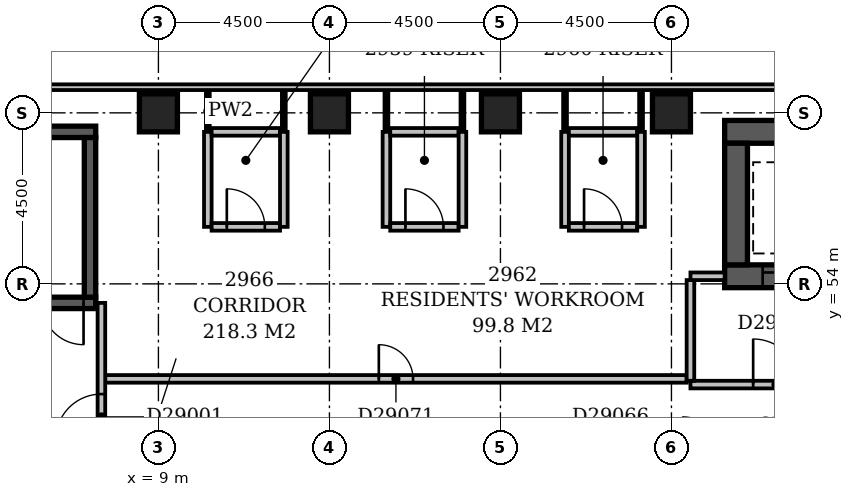
"""IFC4 building model, lengths in metres.
Left out: names, types, materials, properties, quantities, classifications, styles, units other than length and angle.
Written with IfcOpenShell. Run it as: python <this file> out.ifc"""

import sys

from ifc_helpers import new_model, si_unit, direction, frame, frame_2d, origin, origin_2d, place, context, subcontext, project, spatial, rectangle, extrude, element, fill, save


model = new_model("IFC4")
c1 = context("Model", 3, precision=1e-05, world=origin(), true_north=direction((0.0, 1.0)))
c2 = subcontext(c1, "Body", "Model", "MODEL_VIEW")
j1 = project(units=[si_unit("LENGTHUNIT", "METRE"), si_unit("PLANEANGLEUNIT", "RADIAN")], contexts=[c1])
p1 = place(None, origin())
s1 = spatial("IfcSite", under=j1, at=p1, CompositionType="ELEMENT")
p2 = place(p1, origin())
s2 = spatial("IfcBuilding", under=s1, at=p2, CompositionType="ELEMENT")
p3 = place(p2, frame((0.0, 0.0, 119.6)))
s3 = spatial("IfcBuildingStorey", under=s2, at=p3, CompositionType="ELEMENT", Elevation=119.6)
p4 = place(p3, frame((0.35, 53.5, -0.3), z_axis=(0.0, 0.0, 1.0), x_axis=(1.0, 0.0, 0.0)))
e1 = element("IfcWall", 1, at=p4, inside=s3, PredefinedType="SHEAR", context=c2, shape_type="SweptSolid", body=[
    extrude(rectangle(XDim=7.0, YDim=0.3, at=frame_2d((3.5, 0.0))), origin(), (0.0, 0.0, 1.0), 3.6),
])
p5 = place(p4, frame((5.58, 0.0, 0.3)))
e2 = element("IfcOpeningElement", 2, at=p5, cuts=e1, PredefinedType="OPENING", context=c2, shape_type="SweptSolid", body=[
    extrude(rectangle(XDim=1.1, YDim=2.1, at=frame_2d((0.55, 1.05))), frame((0.0, 0.162, 0.0), z_axis=(0.0, -1.0, 0.0), x_axis=(1.0, 0.0, 0.0)), (0.0, 0.0, 1.0), 0.324),
])
p6 = place(p3, frame((0.35, 58.0, -0.3), z_axis=(0.0, 0.0, 1.0), x_axis=(1.0, 0.0, 0.0)))
e3 = element("IfcWall", 3, at=p6, inside=s3, PredefinedType="SHEAR", context=c2, shape_type="SweptSolid", body=[
    extrude(rectangle(XDim=7.0, YDim=0.3, at=frame_2d((3.5, 0.0))), origin(), (0.0, 0.0, 1.0), 3.6),
])
p7 = place(p3, frame((7.2, 53.65, -0.3), z_axis=(0.0, 0.0, 1.0), x_axis=(0.0, 1.0, 0.0)))
e4 = element("IfcWall", 4, at=p7, inside=s3, PredefinedType="SHEAR", context=c2, shape_type="SweptSolid", body=[
    extrude(rectangle(XDim=4.2, YDim=0.3, at=frame_2d((2.1, 0.0))), origin(), (0.0, 0.0, 1.0), 3.6),
])
p8 = place(p3, frame((23.9, 54.2, -0.3), z_axis=(0.0, 0.0, 1.0), x_axis=(1.0, 0.0, 0.0)))
e5 = element("IfcWall", 5, at=p8, inside=s3, PredefinedType="SHEAR", context=c2, shape_type="SweptSolid", body=[
    extrude(rectangle(XDim=3.1, YDim=0.6, at=frame_2d((1.55, 0.0))), origin(), (0.0, 0.0, 1.0), 3.6),
])
p9 = place(p8, frame((1.0, 0.0, 0.3)))
e6 = element("IfcOpeningElement", 6, at=p9, cuts=e5, PredefinedType="OPENING", context=c2, shape_type="SweptSolid", body=[
    extrude(rectangle(XDim=1.1, YDim=2.1, at=frame_2d((0.55, 1.05))), frame((0.0, 0.312, 0.0), z_axis=(0.0, -1.0, 0.0), x_axis=(1.0, 0.0, 0.0)), (0.0, 0.0, 1.0), 0.624),
])
p10 = place(p3, frame((23.9, 58.0, -0.3), z_axis=(0.0, 0.0, 1.0), x_axis=(1.0, 0.0, 0.0)))
e7 = element("IfcWall", 7, at=p10, inside=s3, PredefinedType="SHEAR", context=c2, shape_type="SweptSolid", body=[
    extrude(rectangle(XDim=3.1, YDim=0.6, at=frame_2d((1.55, 0.0))), origin(), (0.0, 0.0, 1.0), 3.6),
])
p11 = place(p3, frame((24.2, 54.5, -0.3), z_axis=(0.0, 0.0, 1.0), x_axis=(0.0, 1.0, 0.0)))
e8 = element("IfcWall", 8, at=p11, inside=s3, PredefinedType="SHEAR", context=c2, shape_type="SweptSolid", body=[
    extrude(rectangle(XDim=3.2, YDim=0.6, at=frame_2d((1.6, 0.0))), origin(), (0.0, 0.0, 1.0), 3.6),
])
for number, where, z_axis, x_axis in (
    (9, (9.0, 58.5, -0.3), (0.0, 0.0, 1.0), (1.0, 0.0, 0.0)),
    (10, (13.5, 58.5, -0.3), (0.0, 0.0, 1.0), (1.0, 0.0, 0.0)),
    (11, (18.0, 58.5, -0.3), (0.0, 0.0, 1.0), (1.0, 0.0, 0.0)),
    (12, (22.5, 58.5, -0.3), (0.0, 0.0, 1.0), (1.0, 0.0, 0.0)),
):
    element("IfcColumn", number, at=place(p3, frame(where, z_axis=z_axis, x_axis=x_axis)), inside=s3, PredefinedType="COLUMN", context=c2, shape_type="SweptSolid", body=[
        extrude(rectangle(XDim=1.0, YDim=1.0, at=origin_2d()), origin(), (0.0, 0.0, 1.0), 3.6),
    ])
p12 = place(p3, frame((68.1, 59.175, 0.0), z_axis=(0.0, 0.0, 1.0), x_axis=(-1.0, 0.0, 0.0)))
e13 = element("IfcWall", 13, at=p12, inside=s3, PredefinedType="STANDARD", context=c2, shape_type="SweptSolid", body=[
    extrude(rectangle(XDim=68.85, YDim=0.15, at=frame_2d((34.425, 0.0))), origin(), (0.0, 0.0, 1.0), 2.7),
])
p13 = place(p12, frame((1.65, 0.0, 0.6)))
e14 = element("IfcOpeningElement", 14, at=p13, cuts=e13, PredefinedType="OPENING", context=c2, shape_type="SweptSolid", body=[
    extrude(rectangle(XDim=2.4, YDim=1.8, at=frame_2d((1.2, 0.9))), frame((0.0, 0.087, 0.0), z_axis=(0.0, -1.0, 0.0), x_axis=(1.0, 0.0, 0.0)), (0.0, 0.0, 1.0), 0.174),
])
p14 = place(p12, frame((6.15, 0.0, 0.6)))
e15 = element("IfcOpeningElement", 15, at=p14, cuts=e13, PredefinedType="OPENING", context=c2, shape_type="SweptSolid", body=[
    extrude(rectangle(XDim=2.4, YDim=1.8, at=frame_2d((1.2, 0.9))), frame((0.0, 0.087, 0.0), z_axis=(0.0, -1.0, 0.0), x_axis=(1.0, 0.0, 0.0)), (0.0, 0.0, 1.0), 0.174),
])
p15 = place(p12, frame((16.347, 0.0, 0.6)))
e16 = element("IfcOpeningElement", 16, at=p15, cuts=e13, PredefinedType="OPENING", context=c2, shape_type="SweptSolid", body=[
    extrude(rectangle(XDim=1.5, YDim=1.8, at=frame_2d((0.75, 0.9))), frame((0.0, 0.087, 0.0), z_axis=(0.0, -1.0, 0.0), x_axis=(1.0, 0.0, 0.0)), (0.0, 0.0, 1.0), 0.174),
])
p16 = place(p12, frame((19.65, 0.0, 0.6)))
e17 = element("IfcOpeningElement", 17, at=p16, cuts=e13, PredefinedType="OPENING", context=c2, shape_type="SweptSolid", body=[
    extrude(rectangle(XDim=2.4, YDim=1.8, at=frame_2d((1.2, 0.9))), frame((0.0, 0.087, 0.0), z_axis=(0.0, -1.0, 0.0), x_axis=(1.0, 0.0, 0.0)), (0.0, 0.0, 1.0), 0.174),
])
p17 = place(p12, frame((37.678, 0.0, 0.6)))
e18 = element("IfcOpeningElement", 18, at=p17, cuts=e13, PredefinedType="OPENING", context=c2, shape_type="SweptSolid", body=[
    extrude(rectangle(XDim=1.2, YDim=1.8, at=frame_2d((0.6, 0.9))), frame((0.0, 0.087, 0.0), z_axis=(0.0, -1.0, 0.0), x_axis=(1.0, 0.0, 0.0)), (0.0, 0.0, 1.0), 0.174),
])
p18 = place(p3, frame((23.0, 51.35, 0.0), z_axis=(0.0, 0.0, 1.0), x_axis=(1.0, 0.0, 0.0)))
e19 = element("IfcWall", 19, at=p18, inside=s3, PredefinedType="PARTITIONING", context=c2, shape_type="SweptSolid", body=[
    extrude(rectangle(XDim=4.8, YDim=0.2, at=frame_2d((2.4, 0.0))), origin(), (0.0, 0.0, 1.0), 3.3),
])
p19 = place(p18, frame((1.65, 0.0, 0.0)))
e20 = element("IfcOpeningElement", 20, at=p19, cuts=e19, PredefinedType="OPENING", context=c2, shape_type="SweptSolid", body=[
    extrude(rectangle(XDim=1.2, YDim=2.1, at=frame_2d((0.6, 1.05))), frame((0.0, 0.112, 0.0), z_axis=(0.0, -1.0, 0.0), x_axis=(1.0, 0.0, 0.0)), (0.0, 0.0, 1.0), 0.224),
])
p20 = place(p3, frame((23.0, 54.2, 0.0), z_axis=(0.0, 0.0, 1.0), x_axis=(1.0, 0.0, 0.0)))
e21 = element("IfcWall", 21, at=p20, inside=s3, PredefinedType="PARTITIONING", context=c2, shape_type="SweptSolid", body=[
    extrude(rectangle(XDim=0.9, YDim=0.2, at=frame_2d((0.45, 0.0))), origin(), (0.0, 0.0, 1.0), 3.3),
])
p21 = place(p3, frame((23.0, 51.45, 0.0), z_axis=(0.0, 0.0, 1.0), x_axis=(0.0, 1.0, 0.0)))
e22 = element("IfcWall", 22, at=p21, inside=s3, PredefinedType="PARTITIONING", context=c2, shape_type="SweptSolid", body=[
    extrude(rectangle(XDim=2.65, YDim=0.2, at=frame_2d((1.325, 0.0))), origin(), (0.0, 0.0, 1.0), 3.3),
])
p22 = place(p3, frame((7.5, 49.6, 0.0), z_axis=(0.0, 0.0, 1.0), x_axis=(0.0, 1.0, 0.0)))
e23 = element("IfcWall", 23, at=p22, inside=s3, PredefinedType="PARTITIONING", context=c2, shape_type="SweptSolid", body=[
    extrude(rectangle(XDim=3.9, YDim=0.2, at=frame_2d((1.95, 0.0))), origin(), (0.0, 0.0, 1.0), 3.3),
])
p23 = place(p22, frame((0.3, 0.0, 0.0)))
e24 = element("IfcOpeningElement", 24, at=p23, cuts=e23, PredefinedType="OPENING", context=c2, shape_type="SweptSolid", body=[
    extrude(rectangle(XDim=1.2, YDim=2.1, at=frame_2d((0.6, 1.05))), frame((0.0, 0.112, 0.0), z_axis=(0.0, -1.0, 0.0), x_axis=(1.0, 0.0, 0.0)), (0.0, 0.0, 1.0), 0.224),
])
p24 = place(p3, frame((7.6, 51.5, 0.0), z_axis=(0.0, 0.0, 1.0), x_axis=(1.0, 0.0, 0.0)))
e25 = element("IfcWall", 25, at=p24, inside=s3, PredefinedType="PARTITIONING", context=c2, shape_type="SweptSolid", body=[
    extrude(rectangle(XDim=15.3, YDim=0.2, at=frame_2d((7.65, 0.0))), origin(), (0.0, 0.0, 1.0), 3.3),
])
p25 = place(p24, frame((7.2, 0.0, 0.0)))
e26 = element("IfcOpeningElement", 26, at=p25, cuts=e25, PredefinedType="OPENING", context=c2, shape_type="SweptSolid", body=[
    extrude(rectangle(XDim=0.9, YDim=2.1, at=frame_2d((0.45, 1.05))), frame((0.0, 0.112, 0.0), z_axis=(0.0, -1.0, 0.0), x_axis=(1.0, 0.0, 0.0)), (0.0, 0.0, 1.0), 0.224),
])
p26 = place(p3, frame((10.3, 55.5, 0.0), z_axis=(0.0, 0.0, 1.0), x_axis=(0.0, 1.0, 0.0)))
e27 = element("IfcWall", 27, at=p26, inside=s3, PredefinedType="PARTITIONING", context=c2, shape_type="SweptSolid", body=[
    extrude(rectangle(XDim=2.5, YDim=0.2, at=frame_2d((1.25, 0.0))), origin(), (0.0, 0.0, 1.0), 3.3),
])
p27 = place(p3, frame((10.4, 55.5, 0.0), z_axis=(0.0, 0.0, 1.0), x_axis=(1.0, 0.0, 0.0)))
e28 = element("IfcWall", 28, at=p27, inside=s3, PredefinedType="PARTITIONING", context=c2, shape_type="SweptSolid", body=[
    extrude(rectangle(XDim=1.8, YDim=0.2, at=frame_2d((0.9, 0.0))), origin(), (0.0, 0.0, 1.0), 3.3),
])
p28 = place(p27, frame((0.4, 0.0, 0.0)))
e29 = element("IfcOpeningElement", 29, at=p28, cuts=e28, PredefinedType="OPENING", context=c2, shape_type="SweptSolid", body=[
    extrude(rectangle(XDim=1.0, YDim=2.1, at=frame_2d((0.5, 1.05))), frame((0.0, 0.112, 0.0), z_axis=(0.0, -1.0, 0.0), x_axis=(1.0, 0.0, 0.0)), (0.0, 0.0, 1.0), 0.224),
])
for number, where, z_axis, x_axis in (
    (30, (12.3, 55.5, 0.0), (0.0, 0.0, 1.0), (0.0, 1.0, 0.0)),
    (31, (15.0, 55.5, 0.0), (0.0, 0.0, 1.0), (0.0, 1.0, 0.0)),
):
    element("IfcWall", number, at=place(p3, frame(where, z_axis=z_axis, x_axis=x_axis)), inside=s3, PredefinedType="PARTITIONING", context=c2, shape_type="SweptSolid", body=[
        extrude(rectangle(XDim=2.5, YDim=0.2, at=frame_2d((1.25, 0.0))), origin(), (0.0, 0.0, 1.0), 3.3),
    ])
p29 = place(p3, frame((15.1, 55.5, 0.0), z_axis=(0.0, 0.0, 1.0), x_axis=(1.0, 0.0, 0.0)))
e32 = element("IfcWall", 32, at=p29, inside=s3, PredefinedType="PARTITIONING", context=c2, shape_type="SweptSolid", body=[
    extrude(rectangle(XDim=1.8, YDim=0.2, at=frame_2d((0.9, 0.0))), origin(), (0.0, 0.0, 1.0), 3.3),
])
p30 = place(p29, frame((0.4, 0.0, 0.0)))
e33 = element("IfcOpeningElement", 33, at=p30, cuts=e32, PredefinedType="OPENING", context=c2, shape_type="SweptSolid", body=[
    extrude(rectangle(XDim=1.0, YDim=2.1, at=frame_2d((0.5, 1.05))), frame((0.0, 0.112, 0.0), z_axis=(0.0, -1.0, 0.0), x_axis=(1.0, 0.0, 0.0)), (0.0, 0.0, 1.0), 0.224),
])
for number, where, z_axis, x_axis in (
    (34, (17.0, 55.5, 0.0), (0.0, 0.0, 1.0), (0.0, 1.0, 0.0)),
    (35, (19.7, 55.5, 0.0), (0.0, 0.0, 1.0), (0.0, 1.0, 0.0)),
):
    element("IfcWall", number, at=place(p3, frame(where, z_axis=z_axis, x_axis=x_axis)), inside=s3, PredefinedType="PARTITIONING", context=c2, shape_type="SweptSolid", body=[
        extrude(rectangle(XDim=2.5, YDim=0.2, at=frame_2d((1.25, 0.0))), origin(), (0.0, 0.0, 1.0), 3.3),
    ])
p31 = place(p3, frame((19.8, 55.5, 0.0), z_axis=(0.0, 0.0, 1.0), x_axis=(1.0, 0.0, 0.0)))
e36 = element("IfcWall", 36, at=p31, inside=s3, PredefinedType="PARTITIONING", context=c2, shape_type="SweptSolid", body=[
    extrude(rectangle(XDim=1.8, YDim=0.2, at=frame_2d((0.9, 0.0))), origin(), (0.0, 0.0, 1.0), 3.3),
])
p32 = place(p31, frame((0.4, 0.0, 0.0)))
e37 = element("IfcOpeningElement", 37, at=p32, cuts=e36, PredefinedType="OPENING", context=c2, shape_type="SweptSolid", body=[
    extrude(rectangle(XDim=1.0, YDim=2.1, at=frame_2d((0.5, 1.05))), frame((0.0, 0.112, 0.0), z_axis=(0.0, -1.0, 0.0), x_axis=(1.0, 0.0, 0.0)), (0.0, 0.0, 1.0), 0.224),
])
p33 = place(p3, frame((21.7, 55.5, 0.0), z_axis=(0.0, 0.0, 1.0), x_axis=(0.0, 1.0, 0.0)))
e38 = element("IfcWall", 38, at=p33, inside=s3, PredefinedType="PARTITIONING", context=c2, shape_type="SweptSolid", body=[
    extrude(rectangle(XDim=2.5, YDim=0.2, at=frame_2d((1.25, 0.0))), origin(), (0.0, 0.0, 1.0), 3.3),
])
p34 = place(p3, frame((10.3, 58.0, 0.0), z_axis=(0.0, 0.0, 1.0), x_axis=(0.0, 1.0, 0.0)))
e39 = element("IfcWall", 39, at=p34, inside=s3, PredefinedType="PARTITIONING", context=c2, shape_type="SweptSolid", body=[
    extrude(rectangle(XDim=1.1, YDim=0.1, at=frame_2d((0.55, 0.0))), origin(), (0.0, 0.0, 1.0), 3.3),
])
p35 = place(p3, frame((10.4, 58.0, 0.0), z_axis=(0.0, 0.0, 1.0), x_axis=(1.0, 0.0, 0.0)))
e40 = element("IfcWall", 40, at=p35, inside=s3, PredefinedType="PARTITIONING", context=c2, shape_type="SweptSolid", body=[
    extrude(rectangle(XDim=1.8, YDim=0.2, at=frame_2d((0.9, 0.0))), origin(), (0.0, 0.0, 1.0), 3.3),
])
for number, where, z_axis, x_axis in (
    (41, (12.3, 58.0, 0.0), (0.0, 0.0, 1.0), (0.0, 1.0, 0.0)),
    (42, (15.0, 58.0, 0.0), (0.0, 0.0, 1.0), (0.0, 1.0, 0.0)),
):
    element("IfcWall", number, at=place(p3, frame(where, z_axis=z_axis, x_axis=x_axis)), inside=s3, PredefinedType="PARTITIONING", context=c2, shape_type="SweptSolid", body=[
        extrude(rectangle(XDim=1.1, YDim=0.1, at=frame_2d((0.55, 0.0))), origin(), (0.0, 0.0, 1.0), 3.3),
    ])
p36 = place(p3, frame((15.1, 58.0, 0.0), z_axis=(0.0, 0.0, 1.0), x_axis=(1.0, 0.0, 0.0)))
e43 = element("IfcWall", 43, at=p36, inside=s3, PredefinedType="PARTITIONING", context=c2, shape_type="SweptSolid", body=[
    extrude(rectangle(XDim=1.8, YDim=0.2, at=frame_2d((0.9, 0.0))), origin(), (0.0, 0.0, 1.0), 3.3),
])
for number, where, z_axis, x_axis in (
    (44, (17.0, 58.0, 0.0), (0.0, 0.0, 1.0), (0.0, 1.0, 0.0)),
    (45, (19.7, 58.0, 0.0), (0.0, 0.0, 1.0), (0.0, 1.0, 0.0)),
):
    element("IfcWall", number, at=place(p3, frame(where, z_axis=z_axis, x_axis=x_axis)), inside=s3, PredefinedType="PARTITIONING", context=c2, shape_type="SweptSolid", body=[
        extrude(rectangle(XDim=1.1, YDim=0.1, at=frame_2d((0.55, 0.0))), origin(), (0.0, 0.0, 1.0), 3.3),
    ])
p37 = place(p3, frame((19.8, 58.0, 0.0), z_axis=(0.0, 0.0, 1.0), x_axis=(1.0, 0.0, 0.0)))
e46 = element("IfcWall", 46, at=p37, inside=s3, PredefinedType="PARTITIONING", context=c2, shape_type="SweptSolid", body=[
    extrude(rectangle(XDim=1.8, YDim=0.2, at=frame_2d((0.9, 0.0))), origin(), (0.0, 0.0, 1.0), 3.3),
])
p38 = place(p3, frame((21.7, 58.0, 0.0), z_axis=(0.0, 0.0, 1.0), x_axis=(0.0, 1.0, 0.0)))
e47 = element("IfcWall", 47, at=p38, inside=s3, PredefinedType="PARTITIONING", context=c2, shape_type="SweptSolid", body=[
    extrude(rectangle(XDim=1.1, YDim=0.1, at=frame_2d((0.55, 0.0))), origin(), (0.0, 0.0, 1.0), 3.3),
])
p39 = place(p23, origin())
e48 = element("IfcDoor", 48, at=p39, inside=s3, OperationType="SINGLE_SWING_LEFT", PredefinedType="DOOR", context=c2, shape_type="SweptSolid", body=[
    extrude(rectangle(XDim=1.2, YDim=2.1, at=frame_2d((0.6, 1.05))), frame((0.0, 0.025, 0.0), z_axis=(0.0, -1.0, 0.0), x_axis=(1.0, 0.0, 0.0)), (0.0, 0.0, 1.0), 0.05),
])
fill(e24, e48)
p40 = place(p19, origin())
e49 = element("IfcDoor", 49, at=p40, inside=s3, OperationType="SINGLE_SWING_LEFT", PredefinedType="DOOR", context=c2, shape_type="SweptSolid", body=[
    extrude(rectangle(XDim=1.2, YDim=2.1, at=frame_2d((0.6, 1.05))), frame((0.0, 0.025, 0.0), z_axis=(0.0, -1.0, 0.0), x_axis=(1.0, 0.0, 0.0)), (0.0, 0.0, 1.0), 0.05),
])
fill(e20, e49)
p41 = place(p9, origin())
e50 = element("IfcDoor", 50, at=p41, inside=s3, OperationType="SLIDING_TO_LEFT", PredefinedType="DOOR", context=c2, shape_type="SweptSolid", body=[
    extrude(rectangle(XDim=1.1, YDim=2.1, at=frame_2d((0.55, 1.05))), frame((0.0, 0.025, 0.0), z_axis=(0.0, -1.0, 0.0), x_axis=(1.0, 0.0, 0.0)), (0.0, 0.0, 1.0), 0.05),
])
fill(e6, e50)
p42 = place(p5, origin())
e51 = element("IfcDoor", 51, at=p42, inside=s3, OperationType="SINGLE_SWING_RIGHT", PredefinedType="DOOR", context=c2, shape_type="SweptSolid", body=[
    extrude(rectangle(XDim=1.1, YDim=2.1, at=frame_2d((0.55, 1.05))), frame((0.0, 0.025, 0.0), z_axis=(0.0, -1.0, 0.0), x_axis=(1.0, 0.0, 0.0)), (0.0, 0.0, 1.0), 0.05),
])
fill(e2, e51)
p43 = place(p25, origin())
e52 = element("IfcDoor", 52, at=p43, inside=s3, OperationType="SINGLE_SWING_LEFT", PredefinedType="DOOR", context=c2, shape_type="SweptSolid", body=[
    extrude(rectangle(XDim=0.9, YDim=2.1, at=frame_2d((0.45, 1.05))), frame((0.0, 0.025, 0.0), z_axis=(0.0, -1.0, 0.0), x_axis=(1.0, 0.0, 0.0)), (0.0, 0.0, 1.0), 0.05),
])
fill(e26, e52)
p44 = place(p28, origin())
e53 = element("IfcDoor", 53, at=p44, inside=s3, OperationType="SINGLE_SWING_LEFT", PredefinedType="DOOR", context=c2, shape_type="SweptSolid", body=[
    extrude(rectangle(XDim=1.0, YDim=2.1, at=frame_2d((0.5, 1.05))), frame((0.0, 0.025, 0.0), z_axis=(0.0, -1.0, 0.0), x_axis=(1.0, 0.0, 0.0)), (0.0, 0.0, 1.0), 0.05),
])
fill(e29, e53)
p45 = place(p30, origin())
e54 = element("IfcDoor", 54, at=p45, inside=s3, OperationType="SINGLE_SWING_LEFT", PredefinedType="DOOR", context=c2, shape_type="SweptSolid", body=[
    extrude(rectangle(XDim=1.0, YDim=2.1, at=frame_2d((0.5, 1.05))), frame((0.0, 0.025, 0.0), z_axis=(0.0, -1.0, 0.0), x_axis=(1.0, 0.0, 0.0)), (0.0, 0.0, 1.0), 0.05),
])
fill(e33, e54)
p46 = place(p32, origin())
e55 = element("IfcDoor", 55, at=p46, inside=s3, OperationType="SINGLE_SWING_LEFT", PredefinedType="DOOR", context=c2, shape_type="SweptSolid", body=[
    extrude(rectangle(XDim=1.0, YDim=2.1, at=frame_2d((0.5, 1.05))), frame((0.0, 0.025, 0.0), z_axis=(0.0, -1.0, 0.0), x_axis=(1.0, 0.0, 0.0)), (0.0, 0.0, 1.0), 0.05),
])
fill(e37, e55)
save(model, sys.argv[1])
